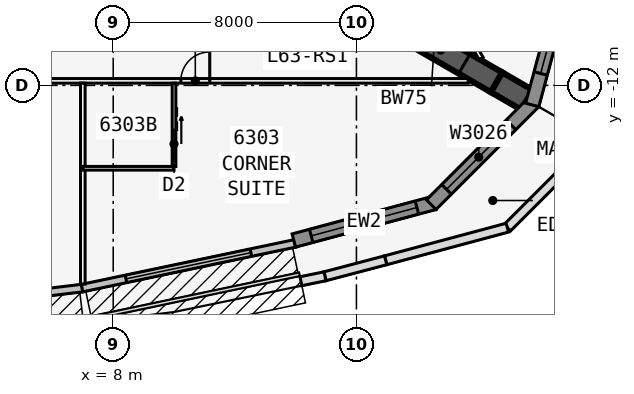
"""IFC4 building model, lengths in metres.
Left out: names, types, materials, properties, quantities, classifications, styles, units other than length and angle.
Written with IfcOpenShell. Run it as: python <this file> out.ifc"""

import sys

from ifc_helpers import new_model, si_unit, direction, frame, frame_2d, origin, place, context, subcontext, project, spatial, polyline, rectangle, outline, extrude, element, fill, save


model = new_model("IFC4")
c1 = context("Model", 3, precision=1e-05, world=origin(), true_north=direction((0.0, 1.0)))
c2 = subcontext(c1, "Body", "Model", "MODEL_VIEW")
j1 = project(units=[si_unit("LENGTHUNIT", "METRE"), si_unit("PLANEANGLEUNIT", "RADIAN")], contexts=[c1])
p1 = place(None, origin())
s1 = spatial("IfcSite", under=j1, at=p1, CompositionType="ELEMENT")
p2 = place(p1, origin())
s2 = spatial("IfcBuilding", under=s1, at=p2, CompositionType="ELEMENT")
p3 = place(p2, frame((0.0, 0.0, 239.3)))
s3 = spatial("IfcBuildingStorey", under=s2, at=p3, CompositionType="ELEMENT", Elevation=239.3)
p4 = place(p3, frame((16.5, -9.526, 0.0), z_axis=(0.0, 0.0, 1.0), x_axis=(0.866031398331, -0.499989616998, 0.0)))
e1 = element("IfcWall", 1, at=p4, inside=s3, PredefinedType="SHEAR", context=c2, shape_type="SweptSolid", body=[
    extrude(rectangle(XDim=4.746, YDim=0.75, at=frame_2d((2.373, 0.0))), origin(), (0.0, 0.0, 1.0), 3.6),
])
p5 = place(p4, frame((1.725, 0.0, 0.0)))
e2 = element("IfcOpeningElement", 2, at=p5, cuts=e1, PredefinedType="OPENING", context=c2, shape_type="SweptSolid", body=[
    extrude(rectangle(XDim=1.8, YDim=2.13, at=frame_2d((0.9, 1.065))), frame((0.0, 0.385, 0.0), z_axis=(0.0, -1.0, 0.0), x_axis=(1.0, 0.0, 0.0)), (0.0, 0.0, 1.0), 0.77),
])
p6 = place(p3, frame((20.61, -11.899, 0.0), z_axis=(0.0, 0.0, 1.0), x_axis=(0.866009537788, -0.500027479704, 0.0)))
e3 = element("IfcWall", 3, at=p6, inside=s3, PredefinedType="SHEAR", context=c2, shape_type="SweptSolid", body=[
    extrude(rectangle(XDim=1.155, YDim=0.75, at=frame_2d((0.577, 0.0))), origin(), (0.0, 0.0, 1.0), 3.6),
])
p7 = place(p3, frame((4.985, -18.906, 0.0), z_axis=(0.0, 0.0, 1.0), x_axis=(0.992877411981, 0.119140441403, 0.0)))
e4 = element("IfcWall", 4, at=p7, inside=s3, PredefinedType="STANDARD", context=c2, shape_type="SweptSolid", body=[
    extrude(rectangle(XDim=2.014, YDim=0.25, at=frame_2d((1.007, 0.0))), origin(), (0.0, 0.0, 1.0), 3.435),
])
p8 = place(p3, frame((6.974, -18.668, 0.0), z_axis=(0.0, 0.0, 1.0), x_axis=(0.978654320409, 0.205513311355, 0.0)))
e5 = element("IfcWall", 5, at=p8, inside=s3, PredefinedType="STANDARD", context=c2, shape_type="SweptSolid", body=[
    extrude(rectangle(XDim=7.153, YDim=0.25, at=frame_2d((3.576, 0.0))), origin(), (0.0, 0.0, 1.0), 3.435),
])
p9 = place(p8, frame((1.476, 0.0, 0.45)))
e6 = element("IfcOpeningElement", 6, at=p9, cuts=e5, PredefinedType="OPENING", context=c2, shape_type="SweptSolid", body=[
    extrude(rectangle(XDim=4.2, YDim=2.6, at=frame_2d((2.1, 1.3))), frame((0.0, 0.135, 0.0), z_axis=(0.0, -1.0, 0.0), x_axis=(1.0, 0.0, 0.0)), (0.0, 0.0, 1.0), 0.27),
])
p10 = place(p3, frame((13.942, -17.103, 0.0), z_axis=(0.0, 0.0, 1.0), x_axis=(0.965913862671, 0.258863689806, 0.0)))
e7 = element("IfcWall", 7, at=p10, inside=s3, PredefinedType="SOLIDWALL", context=c2, shape_type="SweptSolid", body=[
    extrude(rectangle(XDim=4.782, YDim=0.45, at=frame_2d((2.391, 0.0))), origin(), (0.0, 0.0, 1.0), 3.435),
])
p11 = place(p10, frame((0.591, 0.0, 0.45)))
e8 = element("IfcOpeningElement", 8, at=p11, cuts=e7, PredefinedType="OPENING", context=c2, shape_type="SweptSolid", body=[
    extrude(rectangle(XDim=3.6, YDim=2.6, at=frame_2d((1.8, 1.3))), frame((0.0, 0.235, 0.0), z_axis=(0.0, -1.0, 0.0), x_axis=(1.0, 0.0, 0.0)), (0.0, 0.0, 1.0), 0.47),
])
p12 = place(p3, frame((18.46, -15.924, 0.0), z_axis=(0.0, 0.0, 1.0), x_axis=(0.707081252484, 0.707132308968, 0.0)))
e9 = element("IfcWall", 9, at=p12, inside=s3, PredefinedType="SOLIDWALL", context=c2, shape_type="SweptSolid", body=[
    extrude(outline(polyline([(4.782, 0.225), (4.723, 0.225), (4.303, 0.113), (4.273, 0.225), (0.0, 0.225), (0.0, -0.225), (4.782, -0.225), (4.782, 0.225)])), origin(), (0.0, 0.0, 1.0), 3.435),
])
p13 = place(p12, frame((0.711, 0.0, 0.45)))
e10 = element("IfcOpeningElement", 10, at=p13, cuts=e9, PredefinedType="OPENING", context=c2, shape_type="SweptSolid", body=[
    extrude(rectangle(XDim=3.0, YDim=2.6, at=frame_2d((1.5, 1.3))), frame((0.0, 0.235, 0.0), z_axis=(0.0, -1.0, 0.0), x_axis=(1.0, 0.0, 0.0)), (0.0, 0.0, 1.0), 0.47),
])
p14 = place(p3, frame((21.783, -12.644, 0.0), z_axis=(0.0, 0.0, 1.0), x_axis=(0.25880328844, 0.965930048136, 0.0)))
e11 = element("IfcWall", 11, at=p14, inside=s3, PredefinedType="SOLIDWALL", context=c2, shape_type="SweptSolid", body=[
    extrude(outline(polyline([(4.782, 0.225), (0.509, 0.225), (0.479, 0.113), (0.06, 0.225), (0.0, 0.225), (0.0, -0.225), (4.782, -0.225), (4.782, 0.225)])), origin(), (0.0, 0.0, 1.0), 3.435),
])
p15 = place(p14, frame((1.07, 0.0, 0.45)))
e12 = element("IfcOpeningElement", 12, at=p15, cuts=e11, PredefinedType="OPENING", context=c2, shape_type="SweptSolid", body=[
    extrude(rectangle(XDim=3.0, YDim=2.6, at=frame_2d((1.5, 1.3))), frame((0.0, 0.235, 0.0), z_axis=(0.0, -1.0, 0.0), x_axis=(1.0, 0.0, 0.0)), (0.0, 0.0, 1.0), 0.47),
])
p16 = place(p3, frame((23.865, -13.779, 0.0), z_axis=(0.0, 0.0, 1.0), x_axis=(-0.707106781187, -0.707106781187, 0.0)))
e13 = element("IfcWall", 13, at=p16, inside=s3, PredefinedType="PARAPET", context=c2, shape_type="SweptSolid", body=[
    extrude(rectangle(XDim=4.104, YDim=0.3, at=frame_2d((2.052, 0.0))), origin(), (0.0, 0.0, 1.0), 1.1),
])
p17 = place(p3, frame((20.964, -16.68, 0.0), z_axis=(0.0, 0.0, 1.0), x_axis=(-0.965922277207, -0.258832290092, 0.0)))
e14 = element("IfcWall", 14, at=p17, inside=s3, PredefinedType="PARAPET", context=c2, shape_type="SweptSolid", body=[
    extrude(rectangle(XDim=4.144, YDim=0.3, at=frame_2d((2.072, 0.0))), origin(), (0.0, 0.0, 1.0), 1.1),
])
p18 = place(p3, frame((16.961, -17.753, 0.0), z_axis=(0.0, 0.0, 1.0), x_axis=(-0.966988668416, -0.25481937751, 0.0)))
e15 = element("IfcWall", 15, at=p18, inside=s3, PredefinedType="PARAPET", context=c2, shape_type="SweptSolid", body=[
    extrude(rectangle(XDim=2.064, YDim=0.3, at=frame_2d((1.032, 0.0))), origin(), (0.0, 0.0, 1.0), 1.1),
])
p19 = place(p3, frame((14.966, -18.279, 0.0), z_axis=(0.0, 0.0, 1.0), x_axis=(-0.979437739826, -0.201746657479, 0.0)))
e16 = element("IfcWall", 16, at=p19, inside=s3, PredefinedType="PARAPET", context=c2, shape_type="SweptSolid", body=[
    extrude(rectangle(XDim=0.808, YDim=0.3, at=frame_2d((0.404, 0.0))), origin(), (0.0, 0.0, 1.0), 1.1),
])
p20 = place(p3, frame((-19.677, -11.851, 0.0), z_axis=(0.0, 0.0, 1.0), x_axis=(1.0, 0.0, 0.0)))
e17 = element("IfcWall", 17, at=p20, inside=s3, PredefinedType="PARTITIONING", context=c2, shape_type="SweptSolid", body=[
    extrude(rectangle(XDim=39.354, YDim=0.15, at=frame_2d((19.677, 0.0))), origin(), (0.0, 0.0, 1.0), 3.435),
])
p21 = place(p20, frame((8.502, 0.0, 0.0)))
e18 = element("IfcOpeningElement", 18, at=p21, cuts=e17, PredefinedType="OPENING", context=c2, shape_type="SweptSolid", body=[
    extrude(rectangle(XDim=0.95, YDim=2.13, at=frame_2d((0.475, 1.065))), frame((0.0, 0.085, 0.0), z_axis=(0.0, -1.0, 0.0), x_axis=(1.0, 0.0, 0.0)), (0.0, 0.0, 1.0), 0.17),
])
p22 = place(p20, frame((15.677, 0.0, 0.0)))
e19 = element("IfcOpeningElement", 19, at=p22, cuts=e17, PredefinedType="OPENING", context=c2, shape_type="SweptSolid", body=[
    extrude(rectangle(XDim=1.0, YDim=2.13, at=frame_2d((0.5, 1.065))), frame((0.0, 0.085, 0.0), z_axis=(0.0, -1.0, 0.0), x_axis=(1.0, 0.0, 0.0)), (0.0, 0.0, 1.0), 0.17),
])
p23 = place(p20, frame((22.902, 0.0, 0.0)))
e20 = element("IfcOpeningElement", 20, at=p23, cuts=e17, PredefinedType="OPENING", context=c2, shape_type="SweptSolid", body=[
    extrude(rectangle(XDim=0.95, YDim=2.13, at=frame_2d((0.475, 1.065))), frame((0.0, 0.085, 0.0), z_axis=(0.0, -1.0, 0.0), x_axis=(1.0, 0.0, 0.0)), (0.0, 0.0, 1.0), 0.17),
])
p24 = place(p20, frame((29.902, 0.0, 0.0)))
e21 = element("IfcOpeningElement", 21, at=p24, cuts=e17, PredefinedType="OPENING", context=c2, shape_type="SweptSolid", body=[
    extrude(rectangle(XDim=0.95, YDim=2.13, at=frame_2d((0.475, 1.065))), frame((0.0, 0.085, 0.0), z_axis=(0.0, -1.0, 0.0), x_axis=(1.0, 0.0, 0.0)), (0.0, 0.0, 1.0), 0.17),
])
p25 = place(p3, frame((7.0, -11.926, 0.0), z_axis=(0.0, 0.0, 1.0), x_axis=(0.0, -1.0, 0.0)))
e22 = element("IfcWall", 22, at=p25, inside=s3, PredefinedType="PARTITIONING", context=c2, shape_type="SweptSolid", body=[
    extrude(rectangle(XDim=6.609, YDim=0.15, at=frame_2d((3.304, 0.0))), origin(), (0.0, 0.0, 1.0), 2.678),
])
p26 = place(p3, frame((7.0, -14.726, 0.0), z_axis=(0.0, 0.0, 1.0), x_axis=(1.0, 0.0, 0.0)))
e23 = element("IfcWall", 23, at=p26, inside=s3, PredefinedType="PLUMBINGWALL", context=c2, shape_type="SweptSolid", body=[
    extrude(rectangle(XDim=3.0, YDim=0.12, at=frame_2d((1.5, 0.0))), origin(), (0.0, 0.0, 1.0), 3.435),
])
p27 = place(p3, frame((10.0, -11.926, 0.0), z_axis=(0.0, 0.0, 1.0), x_axis=(0.0, -1.0, 0.0)))
e24 = element("IfcWall", 24, at=p27, inside=s3, PredefinedType="PLUMBINGWALL", context=c2, shape_type="SweptSolid", body=[
    extrude(rectangle(XDim=2.74, YDim=0.12, at=frame_2d((1.37, 0.0))), origin(), (0.0, 0.0, 1.0), 3.435),
])
p28 = place(p27, frame((1.55, 0.0, 0.0)))
e25 = element("IfcOpeningElement", 25, at=p28, cuts=e24, PredefinedType="OPENING", context=c2, shape_type="SweptSolid", body=[
    extrude(rectangle(XDim=0.9, YDim=2.13, at=frame_2d((0.45, 1.065))), frame((0.0, 0.07, 0.0), z_axis=(0.0, -1.0, 0.0), x_axis=(1.0, 0.0, 0.0)), (0.0, 0.0, 1.0), 0.14),
])
p29 = place(p3, frame((20.102, -11.115, 0.0), z_axis=(0.0, 0.0, 1.0), x_axis=(-0.500001960654, 0.866024271797, 0.0)))
e26 = element("IfcWall", 26, at=p29, inside=s3, PredefinedType="PARTITIONING", context=c2, shape_type="SweptSolid", body=[
    extrude(rectangle(XDim=12.677, YDim=0.15, at=frame_2d((6.339, 0.0))), origin(), (0.0, 0.0, 1.0), 3.435),
])
p30 = place(p29, frame((8.502, 0.0, 0.0)))
e27 = element("IfcOpeningElement", 27, at=p30, cuts=e26, PredefinedType="OPENING", context=c2, shape_type="SweptSolid", body=[
    extrude(rectangle(XDim=0.95, YDim=2.13, at=frame_2d((0.475, 1.065))), frame((0.0, 0.085, 0.0), z_axis=(0.0, -1.0, 0.0), x_axis=(1.0, 0.0, 0.0)), (0.0, 0.0, 1.0), 0.17),
])
p31 = place(p9, origin())
e28 = element("IfcWindow", 28, at=p31, inside=s3, PartitioningType="SINGLE_PANEL", PredefinedType="WINDOW", context=c2, shape_type="SweptSolid", body=[
    extrude(rectangle(XDim=4.2, YDim=2.6, at=frame_2d((2.1, 1.3))), frame((0.0, 0.03, 0.0), z_axis=(0.0, -1.0, 0.0), x_axis=(1.0, 0.0, 0.0)), (0.0, 0.0, 1.0), 0.06),
])
fill(e6, e28)
p32 = place(p11, origin())
e29 = element("IfcWindow", 29, at=p32, inside=s3, PartitioningType="SINGLE_PANEL", PredefinedType="WINDOW", context=c2, shape_type="SweptSolid", body=[
    extrude(rectangle(XDim=3.6, YDim=2.6, at=frame_2d((1.8, 1.3))), frame((0.0, 0.03, 0.0), z_axis=(0.0, -1.0, 0.0), x_axis=(1.0, 0.0, 0.0)), (0.0, 0.0, 1.0), 0.06),
])
fill(e8, e29)
p33 = place(p13, origin())
e30 = element("IfcWindow", 30, at=p33, inside=s3, PartitioningType="SINGLE_PANEL", PredefinedType="WINDOW", context=c2, shape_type="SweptSolid", body=[
    extrude(rectangle(XDim=3.0, YDim=2.6, at=frame_2d((1.5, 1.3))), frame((0.0, 0.03, 0.0), z_axis=(0.0, -1.0, 0.0), x_axis=(1.0, 0.0, 0.0)), (0.0, 0.0, 1.0), 0.06),
])
fill(e10, e30)
p34 = place(p15, origin())
e31 = element("IfcWindow", 31, at=p34, inside=s3, PartitioningType="SINGLE_PANEL", PredefinedType="WINDOW", context=c2, shape_type="SweptSolid", body=[
    extrude(rectangle(XDim=3.0, YDim=2.6, at=frame_2d((1.5, 1.3))), frame((0.0, 0.03, 0.0), z_axis=(0.0, -1.0, 0.0), x_axis=(1.0, 0.0, 0.0)), (0.0, 0.0, 1.0), 0.06),
])
fill(e12, e31)
p35 = place(p28, origin())
e32 = element("IfcDoor", 32, at=p35, inside=s3, OperationType="SLIDING_TO_LEFT", PredefinedType="DOOR", context=c2, shape_type="SweptSolid", body=[
    extrude(rectangle(XDim=0.9, YDim=2.13, at=frame_2d((0.45, 1.065))), frame((0.0, 0.025, 0.0), z_axis=(0.0, -1.0, 0.0), x_axis=(1.0, 0.0, 0.0)), (0.0, 0.0, 1.0), 0.05),
])
fill(e25, e32)
p36 = place(p24, origin())
e33 = element("IfcDoor", 33, at=p36, inside=s3, OperationType="SINGLE_SWING_RIGHT", PredefinedType="DOOR", context=c2, shape_type="SweptSolid", body=[
    extrude(rectangle(XDim=0.95, YDim=2.13, at=frame_2d((0.475, 1.065))), frame((0.0, 0.025, 0.0), z_axis=(0.0, -1.0, 0.0), x_axis=(1.0, 0.0, 0.0)), (0.0, 0.0, 1.0), 0.05),
])
fill(e21, e33)
p37 = place(p5, origin())
e34 = element("IfcDoor", 34, at=p37, inside=s3, OperationType="DOUBLE_DOOR_DOUBLE_SWING", PredefinedType="DOOR", context=c2, shape_type="SweptSolid", body=[
    extrude(rectangle(XDim=1.8, YDim=2.13, at=frame_2d((0.9, 1.065))), frame((0.0, 0.025, 0.0), z_axis=(0.0, -1.0, 0.0), x_axis=(1.0, 0.0, 0.0)), (0.0, 0.0, 1.0), 0.05),
])
fill(e2, e34)
save(model, sys.argv[1])
